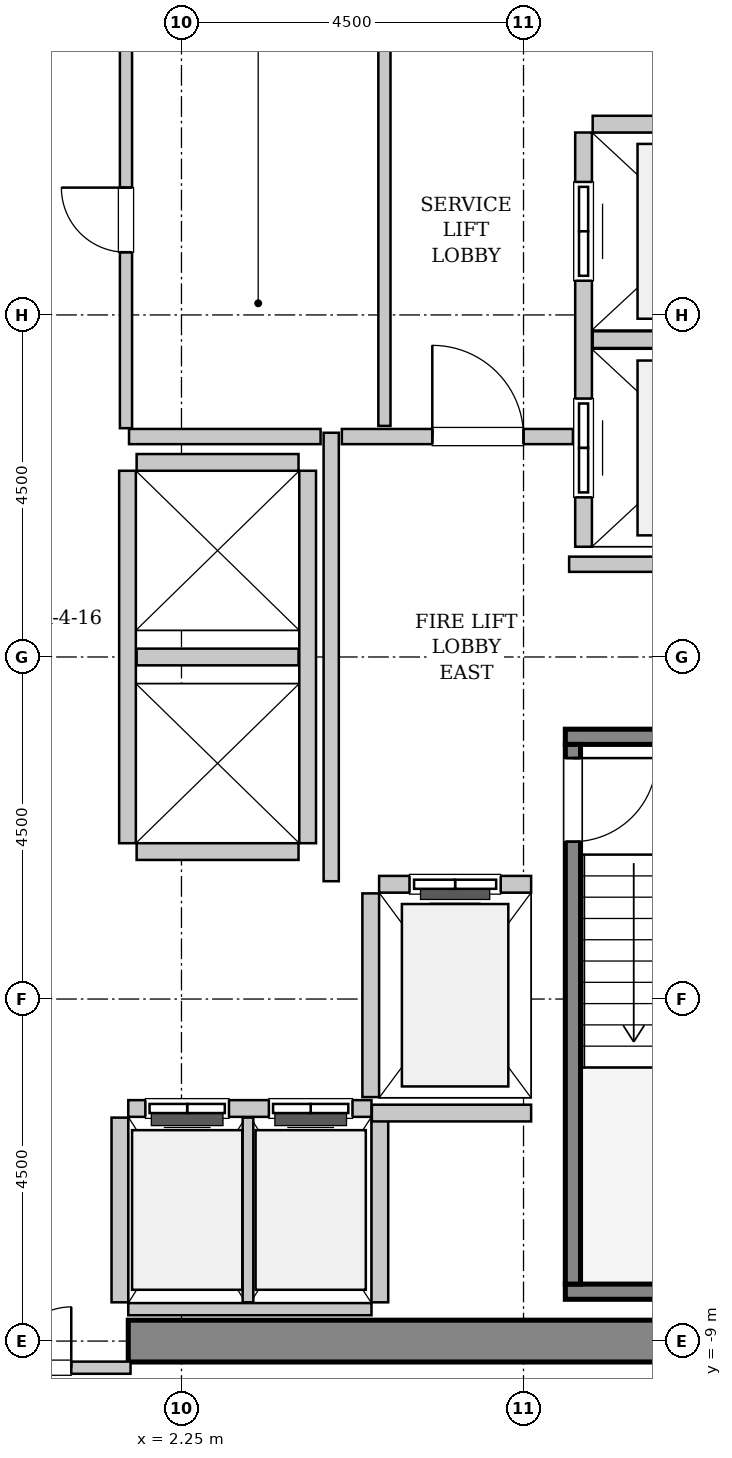
"""IFC4 building model, lengths in metres.
Left out: names, types, materials, properties, quantities, classifications, styles, units other than length and angle.
Written with IfcOpenShell. Run it as: python <this file> out.ifc"""

import sys

from ifc_helpers import new_model, si_unit, direction, frame, frame_2d, origin, place, context, subcontext, project, spatial, rectangle, extrude, source, transform, mapped, element, fill, save


model = new_model("IFC4")
c1 = context("Model", 3, precision=1e-05, world=origin(), true_north=direction((0.0, 1.0)))
c2 = subcontext(c1, "Body", "Model", "MODEL_VIEW")
j1 = project(units=[si_unit("LENGTHUNIT", "METRE"), si_unit("PLANEANGLEUNIT", "RADIAN")], contexts=[c1])
p1 = place(None, origin())
s1 = spatial("IfcSite", under=j1, at=p1, CompositionType="ELEMENT")
p2 = place(p1, origin())
s2 = spatial("IfcBuilding", under=s1, at=p2, CompositionType="ELEMENT")
p3 = place(p2, frame((0.0, 0.0, 164.0)))
s3 = spatial("IfcBuildingStorey", under=s2, at=p3, CompositionType="ELEMENT", Elevation=164.0)
m1 = source(origin(), c2, "Body", "SweptSolid", [
    extrude(rectangle(XDim=9.975, YDim=0.55, at=frame_2d((4.987, 0.0))), origin(), (0.0, 0.0, 1.0), 3.8),
])
p4 = place(p3, frame((1.55, -9.0, 0.0), z_axis=(0.0, 0.0, 1.0), x_axis=(1.0, 0.0, 0.0)))
e1 = element("IfcWall", 1, at=p4, inside=s3, PredefinedType="SHEAR", context=c2, shape_type="MappedRepresentation", body=[
    mapped(m1, transform((0.0, 0.0, 0.0), x_axis=(1.0, 0.0, 0.0), y_axis=(0.0, 1.0, 0.0), z_axis=(0.0, 0.0, 1.0), scale=1.0)),
])
m2 = source(origin(), c2, "Body", "SweptSolid", [
    extrude(rectangle(XDim=3.4, YDim=0.2, at=frame_2d((1.7, 0.0))), origin(), (0.0, 0.0, 1.0), 3.8),
])
p5 = place(p3, frame((7.3, -1.05, 0.0), z_axis=(0.0, 0.0, 1.0), x_axis=(1.0, 0.0, 0.0)))
e2 = element("IfcWall", 2, at=p5, inside=s3, PredefinedType="SOLIDWALL", context=c2, shape_type="MappedRepresentation", body=[
    mapped(m2, transform((0.0, 0.0, 0.0), x_axis=(1.0, 0.0, 0.0), y_axis=(0.0, 1.0, 0.0), z_axis=(0.0, 0.0, 1.0), scale=1.0)),
])
m3 = source(origin(), c2, "Body", "SweptSolid", [
    extrude(rectangle(XDim=3.68, YDim=0.2, at=frame_2d((1.84, 0.0))), origin(), (0.0, 0.0, 1.0), 3.8),
])
p6 = place(p3, frame((7.3, -8.35, 0.0), z_axis=(0.0, 0.0, 1.0), x_axis=(1.0, 0.0, 0.0)))
e3 = element("IfcWall", 3, at=p6, inside=s3, PredefinedType="SOLIDWALL", context=c2, shape_type="MappedRepresentation", body=[
    mapped(m3, transform((0.0, 0.0, 0.0), x_axis=(1.0, 0.0, 0.0), y_axis=(0.0, 1.0, 0.0), z_axis=(0.0, 0.0, 1.0), scale=1.0)),
])
m4 = source(origin(), c2, "Body", "SweptSolid", [
    extrude(rectangle(XDim=7.1, YDim=0.2, at=frame_2d((3.55, 0.0))), origin(), (0.0, 0.0, 1.0), 3.8),
])
p7 = place(p3, frame((7.4, -1.15, 0.0), z_axis=(0.0, 0.0, 1.0), x_axis=(0.0, -1.0, 0.0)))
e4 = element("IfcWall", 4, at=p7, inside=s3, PredefinedType="SOLIDWALL", context=c2, shape_type="MappedRepresentation", body=[
    mapped(m4, transform((0.0, 0.0, 0.0), x_axis=(1.0, 0.0, 0.0), y_axis=(0.0, 1.0, 0.0), z_axis=(0.0, 0.0, 1.0), scale=1.0)),
])
p8 = place(p7, frame((0.18, 0.0, 0.0)))
e5 = element("IfcOpeningElement", 5, at=p8, cuts=e4, PredefinedType="OPENING", context=c2, shape_type="SweptSolid", body=[
    extrude(rectangle(XDim=1.1, YDim=2.15, at=frame_2d((0.55, 1.075))), frame((0.0, 0.11, 0.0), z_axis=(0.0, -1.0, 0.0), x_axis=(1.0, 0.0, 0.0)), (0.0, 0.0, 1.0), 0.22),
])
m5 = source(origin(), c2, "Body", "SweptSolid", [
    extrude(rectangle(XDim=2.0, YDim=0.22, at=frame_2d((1.0, 0.0))), origin(), (0.0, 0.0, 1.0), 3.535),
])
p9 = place(p3, frame((6.85, -2.99, 0.0), z_axis=(0.0, 0.0, 1.0), x_axis=(-1.0, 0.0, 0.0)))
e6 = element("IfcWall", 6, at=p9, inside=s3, PredefinedType="SOLIDWALL", context=c2, shape_type="MappedRepresentation", body=[
    mapped(m5, transform((0.0, 0.0, 0.0), x_axis=(1.0, 0.0, 0.0), y_axis=(0.0, 1.0, 0.0), z_axis=(0.0, 0.0, 1.0), scale=1.0)),
])
p10 = place(p9, frame((0.4, 0.0, 0.0)))
e7 = element("IfcOpeningElement", 7, at=p10, cuts=e6, PredefinedType="OPENING", context=c2, shape_type="SweptSolid", body=[
    extrude(rectangle(XDim=1.2, YDim=2.2, at=frame_2d((0.6, 1.1))), frame((0.0, 0.12, 0.0), z_axis=(0.0, -1.0, 0.0), x_axis=(1.0, 0.0, 0.0)), (0.0, 0.0, 1.0), 0.24),
])
m6 = source(origin(), c2, "Body", "SweptSolid", [
    extrude(rectangle(XDim=2.68, YDim=0.22, at=frame_2d((1.34, 0.0))), origin(), (0.0, 0.0, 1.0), 3.535),
])
p11 = place(p3, frame((4.74, -3.11, 0.0), z_axis=(0.0, 0.0, 1.0), x_axis=(0.0, -1.0, 0.0)))
e8 = element("IfcWall", 8, at=p11, inside=s3, PredefinedType="SOLIDWALL", context=c2, shape_type="MappedRepresentation", body=[
    mapped(m6, transform((0.0, 0.0, 0.0), x_axis=(1.0, 0.0, 0.0), y_axis=(0.0, 1.0, 0.0), z_axis=(0.0, 0.0, 1.0), scale=1.0)),
])
m7 = source(origin(), c2, "Body", "SweptSolid", [
    extrude(rectangle(XDim=5.45, YDim=0.22, at=frame_2d((2.725, 0.0))), origin(), (0.0, 0.0, 1.0), 3.535),
])
p12 = place(p3, frame((7.54, 6.9, 0.0), z_axis=(0.0, 0.0, 1.0), x_axis=(0.0, -1.0, 0.0)))
e9 = element("IfcWall", 9, at=p12, inside=s3, PredefinedType="SOLIDWALL", context=c2, shape_type="MappedRepresentation", body=[
    mapped(m7, transform((0.0, 0.0, 0.0), x_axis=(1.0, 0.0, 0.0), y_axis=(0.0, 1.0, 0.0), z_axis=(0.0, 0.0, 1.0), scale=1.0)),
])
p13 = place(p12, frame((3.5, 0.0, 0.0)))
e10 = element("IfcOpeningElement", 10, at=p13, cuts=e9, PredefinedType="OPENING", context=c2, shape_type="SweptSolid", body=[
    extrude(rectangle(XDim=1.3, YDim=2.3, at=frame_2d((0.65, 1.15))), frame((0.0, 0.12, 0.0), z_axis=(0.0, -1.0, 0.0), x_axis=(1.0, 0.0, 0.0)), (0.0, 0.0, 1.0), 0.24),
])
p14 = place(p12, frame((0.65, 0.0, 0.0)))
e11 = element("IfcOpeningElement", 11, at=p14, cuts=e9, PredefinedType="OPENING", context=c2, shape_type="SweptSolid", body=[
    extrude(rectangle(XDim=1.3, YDim=2.3, at=frame_2d((0.65, 1.15))), frame((0.0, 0.12, 0.0), z_axis=(0.0, -1.0, 0.0), x_axis=(1.0, 0.0, 0.0)), (0.0, 0.0, 1.0), 0.24),
])
m8 = source(origin(), c2, "Body", "SweptSolid", [
    extrude(rectangle(XDim=2.78, YDim=0.22, at=frame_2d((1.39, 0.0))), origin(), (0.0, 0.0, 1.0), 3.535),
])
for number, where, z_axis, x_axis in (
    (12, (7.66, 4.175, 0.0), (0.0, 0.0, 1.0), (1.0, 0.0, 0.0)),
    (13, (10.44, 7.01, 0.0), (0.0, 0.0, 1.0), (-1.0, 0.0, 0.0)),
):
    element("IfcWall", number, at=place(p3, frame(where, z_axis=z_axis, x_axis=x_axis)), inside=s3, PredefinedType="SOLIDWALL", context=c2, shape_type="MappedRepresentation", body=[
        mapped(m8, transform((0.0, 0.0, 0.0), x_axis=(1.0, 0.0, 0.0), y_axis=(0.0, 1.0, 0.0), z_axis=(0.0, 0.0, 1.0), scale=1.0)),
    ])
m9 = source(origin(), c2, "Body", "SweptSolid", [
    extrude(rectangle(XDim=3.2, YDim=0.22, at=frame_2d((1.6, 0.0))), origin(), (0.0, 0.0, 1.0), 3.535),
])
p15 = place(p3, frame((4.75, -5.94, 0.0), z_axis=(0.0, 0.0, 1.0), x_axis=(-1.0, 0.0, 0.0)))
e14 = element("IfcWall", 14, at=p15, inside=s3, PredefinedType="SOLIDWALL", context=c2, shape_type="MappedRepresentation", body=[
    mapped(m9, transform((0.0, 0.0, 0.0), x_axis=(1.0, 0.0, 0.0), y_axis=(0.0, 1.0, 0.0), z_axis=(0.0, 0.0, 1.0), scale=1.0)),
])
p16 = place(p15, frame((1.875, 0.0, 0.0)))
e15 = element("IfcOpeningElement", 15, at=p16, cuts=e14, PredefinedType="OPENING", context=c2, shape_type="SweptSolid", body=[
    extrude(rectangle(XDim=1.1, YDim=2.2, at=frame_2d((0.55, 1.1))), frame((0.0, 0.12, 0.0), z_axis=(0.0, -1.0, 0.0), x_axis=(1.0, 0.0, 0.0)), (0.0, 0.0, 1.0), 0.24),
])
p17 = place(p15, frame((0.25, 0.0, 0.0)))
e16 = element("IfcOpeningElement", 16, at=p17, cuts=e14, PredefinedType="OPENING", context=c2, shape_type="SweptSolid", body=[
    extrude(rectangle(XDim=1.1, YDim=2.2, at=frame_2d((0.55, 1.1))), frame((0.0, 0.12, 0.0), z_axis=(0.0, -1.0, 0.0), x_axis=(1.0, 0.0, 0.0)), (0.0, 0.0, 1.0), 0.24),
])
m10 = source(origin(), c2, "Body", "SweptSolid", [
    extrude(rectangle(XDim=3.2, YDim=0.16, at=frame_2d((1.6, 0.0))), origin(), (0.0, 0.0, 1.0), 2.425),
])
p18 = place(p3, frame((1.55, -8.58, 0.0), z_axis=(0.0, 0.0, 1.0), x_axis=(1.0, 0.0, 0.0)))
e17 = element("IfcWall", 17, at=p18, inside=s3, PredefinedType="PARTITIONING", context=c2, shape_type="MappedRepresentation", body=[
    mapped(m10, transform((0.0, 0.0, 0.0), x_axis=(1.0, 0.0, 0.0), y_axis=(0.0, 1.0, 0.0), z_axis=(0.0, 0.0, 1.0), scale=1.0)),
])
m11 = source(origin(), c2, "Body", "SweptSolid", [
    extrude(rectangle(XDim=2.43, YDim=0.22, at=frame_2d((1.215, 0.0))), origin(), (0.0, 0.0, 1.0), 3.535),
])
p19 = place(p3, frame((1.44, -6.06, 0.0), z_axis=(0.0, 0.0, 1.0), x_axis=(0.0, -1.0, 0.0)))
e18 = element("IfcWall", 18, at=p19, inside=s3, PredefinedType="SOLIDWALL", context=c2, shape_type="MappedRepresentation", body=[
    mapped(m11, transform((0.0, 0.0, 0.0), x_axis=(1.0, 0.0, 0.0), y_axis=(0.0, 1.0, 0.0), z_axis=(0.0, 0.0, 1.0), scale=1.0)),
])
m12 = source(origin(), c2, "Body", "SweptSolid", [
    extrude(rectangle(XDim=2.43, YDim=0.14, at=frame_2d((1.215, 0.0))), origin(), (0.0, 0.0, 1.0), 3.535),
])
p20 = place(p3, frame((3.125, -8.49, 0.0), z_axis=(0.0, 0.0, 1.0), x_axis=(0.0, 1.0, 0.0)))
e19 = element("IfcWall", 19, at=p20, inside=s3, PredefinedType="PARTITIONING", context=c2, shape_type="MappedRepresentation", body=[
    mapped(m12, transform((0.0, 0.0, 0.0), x_axis=(1.0, 0.0, 0.0), y_axis=(0.0, 1.0, 0.0), z_axis=(0.0, 0.0, 1.0), scale=1.0)),
])
p21 = place(p3, frame((4.86, -8.49, 0.0), z_axis=(0.0, 0.0, 1.0), x_axis=(0.0, 1.0, 0.0)))
e20 = element("IfcWall", 20, at=p21, inside=s3, PredefinedType="SOLIDWALL", context=c2, shape_type="MappedRepresentation", body=[
    mapped(m11, transform((0.0, 0.0, 0.0), x_axis=(1.0, 0.0, 0.0), y_axis=(0.0, 1.0, 0.0), z_axis=(0.0, 0.0, 1.0), scale=1.0)),
])
m13 = source(origin(), c2, "Body", "SweptSolid", [
    extrude(rectangle(XDim=4.9, YDim=0.22, at=frame_2d((2.45, 0.0))), origin(), (0.0, 0.0, 1.0), 3.535),
])
for number, where, z_axis, x_axis in (
    (21, (1.54, 2.45, 0.0), (0.0, 0.0, 1.0), (0.0, -1.0, 0.0)),
    (22, (3.91, -2.45, 0.0), (0.0, 0.0, 1.0), (0.0, 1.0, 0.0)),
):
    element("IfcWall", number, at=place(p3, frame(where, z_axis=z_axis, x_axis=x_axis)), inside=s3, PredefinedType="SOLIDWALL", context=c2, shape_type="MappedRepresentation", body=[
        mapped(m13, transform((0.0, 0.0, 0.0), x_axis=(1.0, 0.0, 0.0), y_axis=(0.0, 1.0, 0.0), z_axis=(0.0, 0.0, 1.0), scale=1.0)),
    ])
m14 = source(origin(), c2, "Body", "SweptSolid", [
    extrude(rectangle(XDim=2.13, YDim=0.22, at=frame_2d((1.065, 0.0))), origin(), (0.0, 0.0, 1.0), 3.535),
])
for number, where, z_axis, x_axis in (
    (23, (1.66, -2.56, 0.0), (0.0, 0.0, 1.0), (1.0, 0.0, 0.0)),
    (24, (1.66, 0.0, 0.0), (0.0, 0.0, 1.0), (1.0, 0.0, 0.0)),
    (25, (3.79, 2.56, 0.0), (0.0, 0.0, 1.0), (-1.0, 0.0, 0.0)),
):
    element("IfcWall", number, at=place(p3, frame(where, z_axis=z_axis, x_axis=x_axis)), inside=s3, PredefinedType="SOLIDWALL", context=c2, shape_type="MappedRepresentation", body=[
        mapped(m14, transform((0.0, 0.0, 0.0), x_axis=(1.0, 0.0, 0.0), y_axis=(0.0, 1.0, 0.0), z_axis=(0.0, 0.0, 1.0), scale=1.0)),
    ])
m15 = source(origin(), c2, "Body", "SweptSolid", [
    extrude(rectangle(XDim=2.095, YDim=0.22, at=frame_2d((1.048, 0.0))), origin(), (0.0, 0.0, 1.0), 3.535),
])
p22 = place(p3, frame((4.755, -6.0, 0.0), z_axis=(0.0, 0.0, 1.0), x_axis=(1.0, 0.0, 0.0)))
e26 = element("IfcWall", 26, at=p22, inside=s3, PredefinedType="SOLIDWALL", context=c2, shape_type="MappedRepresentation", body=[
    mapped(m15, transform((0.0, 0.0, 0.0), x_axis=(1.0, 0.0, 0.0), y_axis=(0.0, 1.0, 0.0), z_axis=(0.0, 0.0, 1.0), scale=1.0)),
])
m16 = source(origin(), c2, "Body", "SweptSolid", [
    extrude(rectangle(XDim=5.9, YDim=0.2, at=frame_2d((2.95, 0.0))), origin(), (0.0, 0.0, 1.0), 3.535),
])
p23 = place(p3, frame((4.22, -2.95, 0.0), z_axis=(0.0, 0.0, 1.0), x_axis=(0.0, 1.0, 0.0)))
e27 = element("IfcWall", 27, at=p23, inside=s3, PredefinedType="PARTITIONING", context=c2, shape_type="MappedRepresentation", body=[
    mapped(m16, transform((0.0, 0.0, 0.0), x_axis=(1.0, 0.0, 0.0), y_axis=(0.0, 1.0, 0.0), z_axis=(0.0, 0.0, 1.0), scale=1.0)),
])
m17 = source(origin(), c2, "Body", "SweptSolid", [
    extrude(rectangle(XDim=2.52, YDim=0.2, at=frame_2d((1.26, 0.0))), origin(), (0.0, 0.0, 1.0), 3.535),
])
p24 = place(p3, frame((1.56, 2.9, 0.0), z_axis=(0.0, 0.0, 1.0), x_axis=(1.0, 0.0, 0.0)))
e28 = element("IfcWall", 28, at=p24, inside=s3, PredefinedType="PARTITIONING", context=c2, shape_type="MappedRepresentation", body=[
    mapped(m17, transform((0.0, 0.0, 0.0), x_axis=(1.0, 0.0, 0.0), y_axis=(0.0, 1.0, 0.0), z_axis=(0.0, 0.0, 1.0), scale=1.0)),
])
m18 = source(origin(), c2, "Body", "SweptSolid", [
    extrude(rectangle(XDim=3.04, YDim=0.2, at=frame_2d((1.52, 0.0))), origin(), (0.0, 0.0, 1.0), 3.535),
])
p25 = place(p3, frame((4.36, 2.9, 0.0), z_axis=(0.0, 0.0, 1.0), x_axis=(1.0, 0.0, 0.0)))
e29 = element("IfcWall", 29, at=p25, inside=s3, PredefinedType="PARTITIONING", context=c2, shape_type="MappedRepresentation", body=[
    mapped(m18, transform((0.0, 0.0, 0.0), x_axis=(1.0, 0.0, 0.0), y_axis=(0.0, 1.0, 0.0), z_axis=(0.0, 0.0, 1.0), scale=1.0)),
])
p26 = place(p25, frame((1.19, 0.0, 0.0)))
e30 = element("IfcOpeningElement", 30, at=p26, cuts=e29, PredefinedType="OPENING", context=c2, shape_type="SweptSolid", body=[
    extrude(rectangle(XDim=1.2, YDim=2.15, at=frame_2d((0.6, 1.075))), frame((0.0, 0.11, 0.0), z_axis=(0.0, -1.0, 0.0), x_axis=(1.0, 0.0, 0.0)), (0.0, 0.0, 1.0), 0.22),
])
m19 = source(origin(), c2, "Body", "SweptSolid", [
    extrude(rectangle(XDim=4.11, YDim=0.2, at=frame_2d((2.055, 0.0))), origin(), (0.0, 0.0, 1.0), 3.535),
])
p27 = place(p3, frame((7.35, 1.22, 0.0), z_axis=(0.0, 0.0, 1.0), x_axis=(1.0, 0.0, 0.0)))
e31 = element("IfcWall", 31, at=p27, inside=s3, PredefinedType="PARTITIONING", context=c2, shape_type="MappedRepresentation", body=[
    mapped(m19, transform((0.0, 0.0, 0.0), x_axis=(1.0, 0.0, 0.0), y_axis=(0.0, 1.0, 0.0), z_axis=(0.0, 0.0, 1.0), scale=1.0)),
])
m20 = source(origin(), c2, "Body", "SweptSolid", [
    extrude(rectangle(XDim=3.16, YDim=0.16, at=frame_2d((1.58, 0.0))), origin(), (0.0, 0.0, 1.0), 2.425),
])
p28 = place(p3, frame((-1.58, -9.35, 0.0), z_axis=(0.0, 0.0, 1.0), x_axis=(1.0, 0.0, 0.0)))
e32 = element("IfcWall", 32, at=p28, inside=s3, PredefinedType="PARTITIONING", context=c2, shape_type="MappedRepresentation", body=[
    mapped(m20, transform((0.0, 0.0, 0.0), x_axis=(1.0, 0.0, 0.0), y_axis=(0.0, 1.0, 0.0), z_axis=(0.0, 0.0, 1.0), scale=1.0)),
])
p29 = place(p28, frame((0.78, 0.0, 0.0)))
e33 = element("IfcOpeningElement", 33, at=p29, cuts=e32, PredefinedType="OPENING", context=c2, shape_type="SweptSolid", body=[
    extrude(rectangle(XDim=1.6, YDim=2.3, at=frame_2d((0.8, 1.15))), frame((0.0, 0.09, 0.0), z_axis=(0.0, -1.0, 0.0), x_axis=(1.0, 0.0, 0.0)), (0.0, 0.0, 1.0), 0.18),
])
m21 = source(origin(), c2, "Body", "SweptSolid", [
    extrude(rectangle(XDim=5.45, YDim=0.16, at=frame_2d((2.725, 0.0))), origin(), (0.0, 0.0, 1.0), 3.535),
])
p30 = place(p3, frame((4.92, 3.04, 0.0), z_axis=(0.0, 0.0, 1.0), x_axis=(0.0, 1.0, 0.0)))
e34 = element("IfcWall", 34, at=p30, inside=s3, PredefinedType="PARTITIONING", context=c2, shape_type="MappedRepresentation", body=[
    mapped(m21, transform((0.0, 0.0, 0.0), x_axis=(1.0, 0.0, 0.0), y_axis=(0.0, 1.0, 0.0), z_axis=(0.0, 0.0, 1.0), scale=1.0)),
])
m22 = source(origin(), c2, "Body", "SweptSolid", [
    extrude(rectangle(XDim=5.48, YDim=0.16, at=frame_2d((2.74, 0.0))), origin(), (0.0, 0.0, 1.0), 3.535),
])
p31 = place(p3, frame((1.52, 3.01, 0.0), z_axis=(0.0, 0.0, 1.0), x_axis=(0.0, 1.0, 0.0)))
e35 = element("IfcWall", 35, at=p31, inside=s3, PredefinedType="PARTITIONING", context=c2, shape_type="MappedRepresentation", body=[
    mapped(m22, transform((0.0, 0.0, 0.0), x_axis=(1.0, 0.0, 0.0), y_axis=(0.0, 1.0, 0.0), z_axis=(0.0, 0.0, 1.0), scale=1.0)),
])
p32 = place(p31, frame((2.315, 0.0, 0.0)))
e36 = element("IfcOpeningElement", 36, at=p32, cuts=e35, PredefinedType="OPENING", context=c2, shape_type="SweptSolid", body=[
    extrude(rectangle(XDim=0.85, YDim=2.1, at=frame_2d((0.425, 1.05))), frame((0.0, 0.09, 0.0), z_axis=(0.0, -1.0, 0.0), x_axis=(1.0, 0.0, 0.0)), (0.0, 0.0, 1.0), 0.18),
])
m23 = source(origin(), c2, "Body", "SweptSolid", [
    extrude(rectangle(XDim=1.1, YDim=2.15, at=frame_2d((0.55, 1.075))), frame((0.0, 0.025, 0.0), z_axis=(0.0, -1.0, 0.0), x_axis=(1.0, 0.0, 0.0)), (0.0, 0.0, 1.0), 0.05),
])
p33 = place(p8, origin())
e37 = element("IfcDoor", 37, at=p33, inside=s3, OperationType="SINGLE_SWING_LEFT", PredefinedType="DOOR", context=c2, shape_type="MappedRepresentation", body=[
    mapped(m23, transform((0.0, 0.0, 0.0), x_axis=(1.0, 0.0, 0.0), y_axis=(0.0, 1.0, 0.0), z_axis=(0.0, 0.0, 1.0), scale=1.0)),
])
fill(e5, e37)
m24 = source(origin(), c2, "Body", "SweptSolid", [
    extrude(rectangle(XDim=1.2, YDim=2.2, at=frame_2d((0.6, 1.1))), frame((0.0, 0.025, 0.0), z_axis=(0.0, -1.0, 0.0), x_axis=(1.0, 0.0, 0.0)), (0.0, 0.0, 1.0), 0.05),
])
p34 = place(p10, origin())
e38 = element("IfcDoor", 38, at=p34, inside=s3, OperationType="SLIDING_TO_LEFT", PredefinedType="DOOR", context=c2, shape_type="MappedRepresentation", body=[
    mapped(m24, transform((0.0, 0.0, 0.0), x_axis=(1.0, 0.0, 0.0), y_axis=(0.0, 1.0, 0.0), z_axis=(0.0, 0.0, 1.0), scale=1.0)),
])
fill(e7, e38)
m25 = source(origin(), c2, "Body", "SweptSolid", [
    extrude(rectangle(XDim=1.3, YDim=2.3, at=frame_2d((0.65, 1.15))), frame((0.0, 0.025, 0.0), z_axis=(0.0, -1.0, 0.0), x_axis=(1.0, 0.0, 0.0)), (0.0, 0.0, 1.0), 0.05),
])
p35 = place(p13, origin())
e39 = element("IfcDoor", 39, at=p35, inside=s3, OperationType="SLIDING_TO_RIGHT", PredefinedType="DOOR", context=c2, shape_type="MappedRepresentation", body=[
    mapped(m25, transform((0.0, 0.0, 0.0), x_axis=(1.0, 0.0, 0.0), y_axis=(0.0, 1.0, 0.0), z_axis=(0.0, 0.0, 1.0), scale=1.0)),
])
fill(e10, e39)
p36 = place(p14, origin())
e40 = element("IfcDoor", 40, at=p36, inside=s3, OperationType="SLIDING_TO_RIGHT", PredefinedType="DOOR", context=c2, shape_type="MappedRepresentation", body=[
    mapped(m25, transform((0.0, 0.0, 0.0), x_axis=(1.0, 0.0, 0.0), y_axis=(0.0, 1.0, 0.0), z_axis=(0.0, 0.0, 1.0), scale=1.0)),
])
fill(e11, e40)
m26 = source(origin(), c2, "Body", "SweptSolid", [
    extrude(rectangle(XDim=1.1, YDim=2.2, at=frame_2d((0.55, 1.1))), frame((0.0, 0.025, 0.0), z_axis=(0.0, -1.0, 0.0), x_axis=(1.0, 0.0, 0.0)), (0.0, 0.0, 1.0), 0.05),
])
p37 = place(p16, origin())
e41 = element("IfcDoor", 41, at=p37, inside=s3, OperationType="DOUBLE_DOOR_SLIDING", PredefinedType="DOOR", context=c2, shape_type="MappedRepresentation", body=[
    mapped(m26, transform((0.0, 0.0, 0.0), x_axis=(1.0, 0.0, 0.0), y_axis=(0.0, 1.0, 0.0), z_axis=(0.0, 0.0, 1.0), scale=1.0)),
])
fill(e15, e41)
p38 = place(p17, origin())
e42 = element("IfcDoor", 42, at=p38, inside=s3, OperationType="DOUBLE_DOOR_SLIDING", PredefinedType="DOOR", context=c2, shape_type="MappedRepresentation", body=[
    mapped(m26, transform((0.0, 0.0, 0.0), x_axis=(1.0, 0.0, 0.0), y_axis=(0.0, 1.0, 0.0), z_axis=(0.0, 0.0, 1.0), scale=1.0)),
])
fill(e16, e42)
m27 = source(origin(), c2, "Body", "SweptSolid", [
    extrude(rectangle(XDim=1.2, YDim=2.15, at=frame_2d((0.6, 1.075))), frame((0.0, 0.025, 0.0), z_axis=(0.0, -1.0, 0.0), x_axis=(1.0, 0.0, 0.0)), (0.0, 0.0, 1.0), 0.05),
])
p39 = place(p26, origin())
e43 = element("IfcDoor", 43, at=p39, inside=s3, OperationType="SINGLE_SWING_LEFT", PredefinedType="DOOR", context=c2, shape_type="MappedRepresentation", body=[
    mapped(m27, transform((0.0, 0.0, 0.0), x_axis=(1.0, 0.0, 0.0), y_axis=(0.0, 1.0, 0.0), z_axis=(0.0, 0.0, 1.0), scale=1.0)),
])
fill(e30, e43)
m28 = source(origin(), c2, "Body", "SweptSolid", [
    extrude(rectangle(XDim=1.6, YDim=2.3, at=frame_2d((0.8, 1.15))), frame((0.0, 0.025, 0.0), z_axis=(0.0, -1.0, 0.0), x_axis=(1.0, 0.0, 0.0)), (0.0, 0.0, 1.0), 0.05),
])
p40 = place(p29, origin())
e44 = element("IfcDoor", 44, at=p40, inside=s3, OperationType="DOUBLE_DOOR_SINGLE_SWING", PredefinedType="DOOR", context=c2, shape_type="MappedRepresentation", body=[
    mapped(m28, transform((0.0, 0.0, 0.0), x_axis=(1.0, 0.0, 0.0), y_axis=(0.0, 1.0, 0.0), z_axis=(0.0, 0.0, 1.0), scale=1.0)),
])
fill(e33, e44)
m29 = source(origin(), c2, "Body", "SweptSolid", [
    extrude(rectangle(XDim=0.85, YDim=2.1, at=frame_2d((0.425, 1.05))), frame((0.0, 0.025, 0.0), z_axis=(0.0, -1.0, 0.0), x_axis=(1.0, 0.0, 0.0)), (0.0, 0.0, 1.0), 0.05),
])
p41 = place(p32, origin())
e45 = element("IfcDoor", 45, at=p41, inside=s3, OperationType="SINGLE_SWING_RIGHT", PredefinedType="DOOR", context=c2, shape_type="MappedRepresentation", body=[
    mapped(m29, transform((0.0, 0.0, 0.0), x_axis=(1.0, 0.0, 0.0), y_axis=(0.0, 1.0, 0.0), z_axis=(0.0, 0.0, 1.0), scale=1.0)),
])
fill(e36, e45)
save(model, sys.argv[1])
